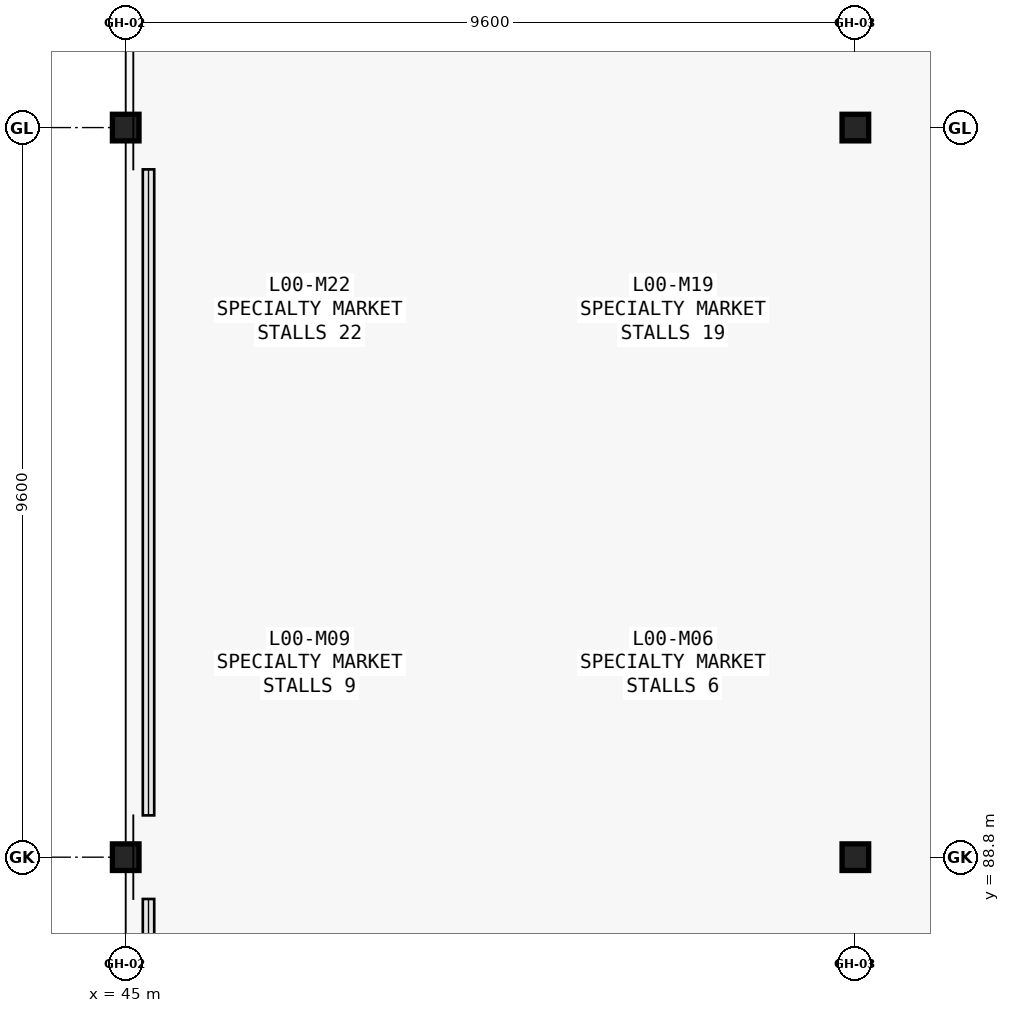
"""IFC4 building model, lengths in metres.
Left out: names, types, materials, properties, quantities, classifications, styles, units other than length and angle.
Written with IfcOpenShell. Run it as: python <this file> out.ifc"""

import sys

from ifc_helpers import new_model, si_unit, direction, frame, origin, origin_2d, place, context, subcontext, project, spatial, hollow_rectangle, extrude, element, save


model = new_model("IFC4")
c1 = context("Model", 3, precision=1e-05, world=origin(), true_north=direction((0.0, 1.0)))
c2 = subcontext(c1, "Body", "Model", "MODEL_VIEW")
j1 = project(units=[si_unit("LENGTHUNIT", "METRE"), si_unit("PLANEANGLEUNIT", "RADIAN")], contexts=[c1])
p1 = place(None, origin())
s1 = spatial("IfcSite", under=j1, at=p1, CompositionType="ELEMENT")
p2 = place(p1, origin())
s2 = spatial("IfcBuilding", under=s1, at=p2, CompositionType="ELEMENT")
p3 = place(p2, origin())
s3 = spatial("IfcBuildingStorey", under=s2, at=p3, CompositionType="ELEMENT", Elevation=0.0)
for number, where, z_axis, x_axis in (
    (1, (45.0, 88.8, 0.0), (0.0, 0.0, 1.0), (1.0, 0.0, 0.0)),
    (2, (45.0, 98.4, 0.0), (0.0, 0.0, 1.0), (1.0, 0.0, 0.0)),
    (3, (54.6, 88.8, 0.0), (0.0, 0.0, 1.0), (1.0, 0.0, 0.0)),
    (4, (54.6, 98.4, 0.0), (0.0, 0.0, 1.0), (1.0, 0.0, 0.0)),
):
    element("IfcColumn", number, at=place(p3, frame(where, z_axis=z_axis, x_axis=x_axis)), inside=s3, PredefinedType="COLUMN", context=c2, shape_type="SweptSolid", body=[
        extrude(hollow_rectangle(XDim=0.35, YDim=0.35, WallThickness=0.012, InnerFilletRadius=0.012, OuterFilletRadius=0.016, at=origin_2d()), origin(), (0.0, 0.0, 1.0), 6.0),
    ])
save(model, sys.argv[1])
